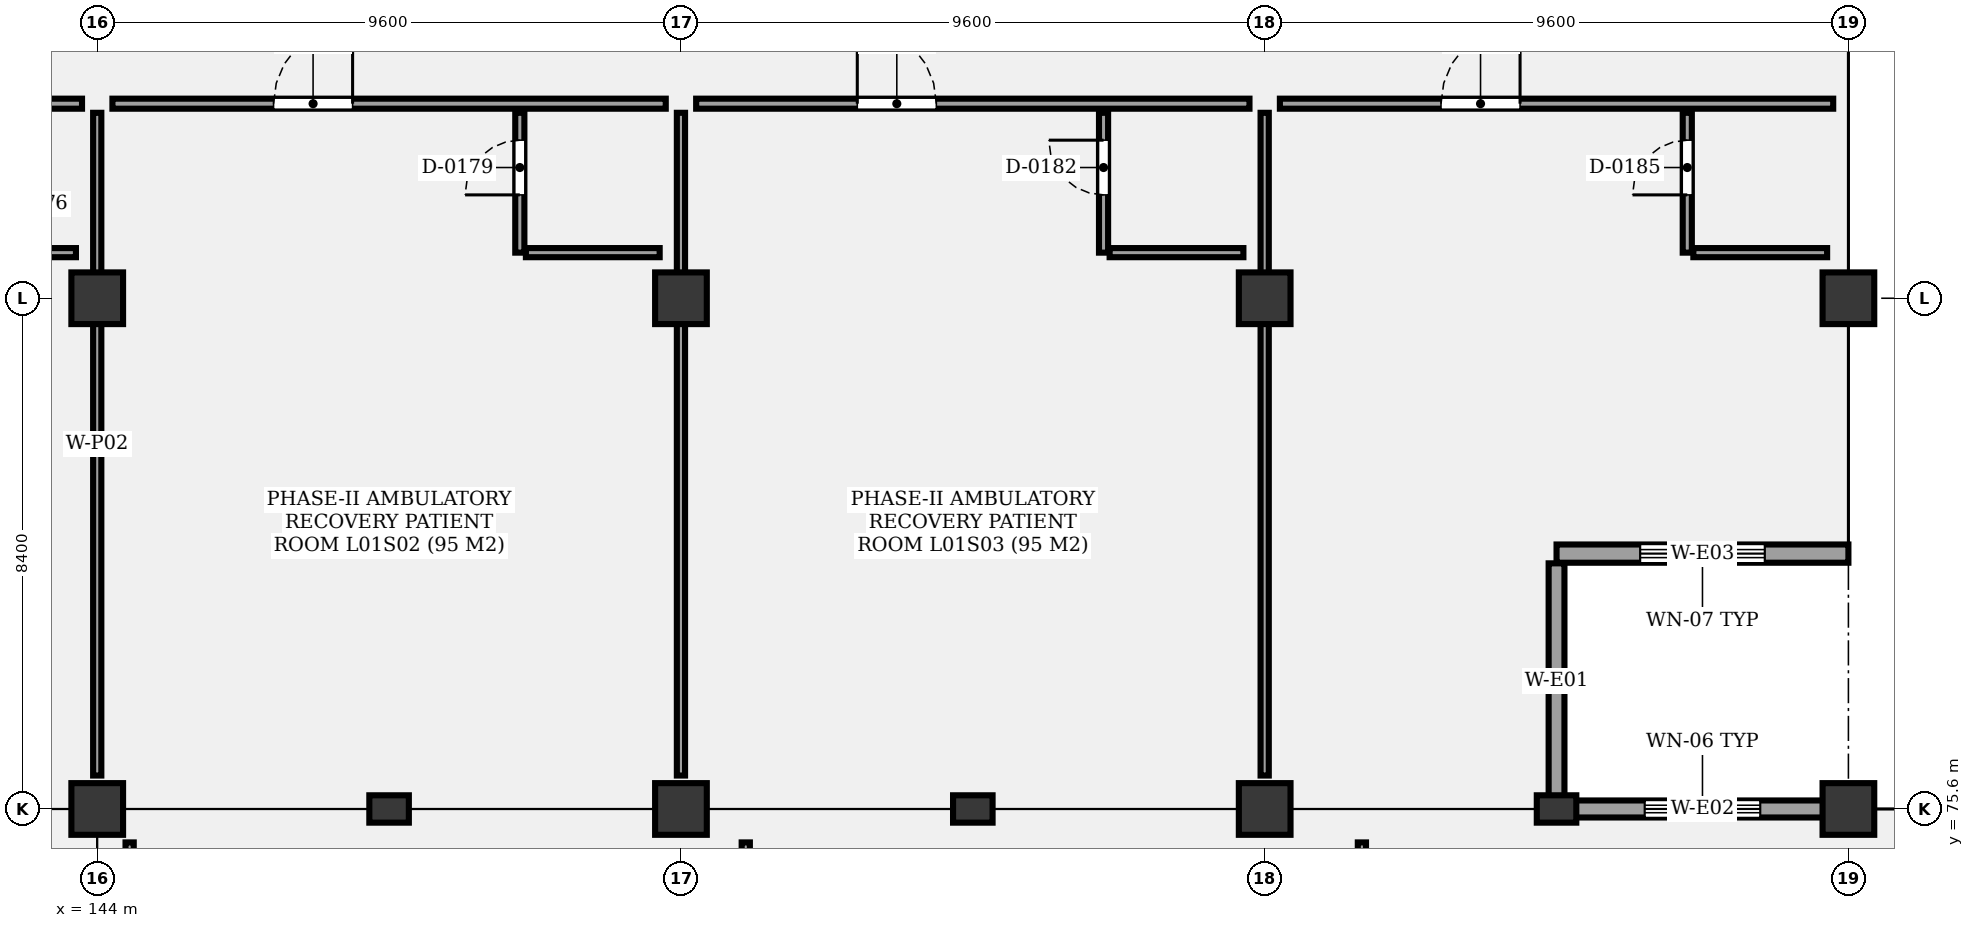
"""IFC4 building model, lengths in metres.
Left out: names, types, materials, properties, quantities, classifications, styles, units other than length and angle.
Written with IfcOpenShell. Run it as: python <this file> out.ifc"""

import sys

from ifc_helpers import new_model, si_unit, direction, frame, frame_2d, origin, origin_2d, place, context, subcontext, project, spatial, rectangle, extrude, element, fill, save


model = new_model("IFC4")
c1 = context("Model", 3, precision=1e-05, world=origin(), true_north=direction((0.0, 1.0)))
c2 = subcontext(c1, "Body", "Model", "MODEL_VIEW")
j1 = project(units=[si_unit("LENGTHUNIT", "METRE"), si_unit("PLANEANGLEUNIT", "RADIAN")], contexts=[c1])
p1 = place(None, origin())
s1 = spatial("IfcSite", under=j1, at=p1, CompositionType="ELEMENT")
p2 = place(p1, origin())
s2 = spatial("IfcBuilding", under=s1, at=p2, CompositionType="ELEMENT")
p3 = place(p2, frame((0.0, 0.0, 5.1)))
s3 = spatial("IfcBuildingStorey", under=s2, at=p3, CompositionType="ELEMENT", Elevation=5.1)
for number, where, z_axis, x_axis in (
    (1, (144.0, 75.6, 0.0), (0.0, 0.0, 1.0), (1.0, 0.0, 0.0)),
    (2, (144.0, 84.0, 0.0), (0.0, 0.0, 1.0), (1.0, 0.0, 0.0)),
    (3, (153.6, 75.6, 0.0), (0.0, 0.0, 1.0), (1.0, 0.0, 0.0)),
    (4, (153.6, 84.0, 0.0), (0.0, 0.0, 1.0), (1.0, 0.0, 0.0)),
    (5, (163.2, 75.6, 0.0), (0.0, 0.0, 1.0), (1.0, 0.0, 0.0)),
    (6, (163.2, 84.0, 0.0), (0.0, 0.0, 1.0), (1.0, 0.0, 0.0)),
    (7, (172.8, 75.6, 0.0), (0.0, 0.0, 1.0), (1.0, 0.0, 0.0)),
    (8, (172.8, 84.0, 0.0), (0.0, 0.0, 1.0), (1.0, 0.0, 0.0)),
):
    element("IfcColumn", number, at=place(p3, frame(where, z_axis=z_axis, x_axis=x_axis)), inside=s3, PredefinedType="COLUMN", context=c2, shape_type="SweptSolid", body=[
        extrude(rectangle(XDim=0.85, YDim=0.85, at=origin_2d()), origin(), (0.0, 0.0, 1.0), 4.8),
    ])
for number, where, z_axis, x_axis in (
    (9, (148.8, 75.6, 0.0), (0.0, 0.0, 1.0), (1.0, 0.0, 0.0)),
    (10, (158.4, 75.6, 0.0), (0.0, 0.0, 1.0), (1.0, 0.0, 0.0)),
    (11, (168.0, 75.6, 0.0), (0.0, 0.0, 1.0), (1.0, 0.0, 0.0)),
):
    element("IfcColumn", number, at=place(p3, frame(where, z_axis=z_axis, x_axis=x_axis)), inside=s3, PredefinedType="PILASTER", context=c2, shape_type="SweptSolid", body=[
        extrude(rectangle(XDim=0.65, YDim=0.45, at=origin_2d()), origin(), (0.0, 0.0, 1.0), 4.8),
    ])
p4 = place(p3, frame((168.0, 75.6, 0.0), z_axis=(0.0, 0.0, 1.0), x_axis=(1.0, 0.0, 0.0)))
e12 = element("IfcWall", 12, at=p4, inside=s3, PredefinedType="SOLIDWALL", context=c2, shape_type="SweptSolid", body=[
    extrude(rectangle(XDim=4.8, YDim=0.28, at=frame_2d((2.4, 0.0))), origin(), (0.0, 0.0, 1.0), 3.94),
])
p5 = place(p4, frame((1.45, 0.0, 0.85)))
e13 = element("IfcOpeningElement", 13, at=p5, cuts=e12, PredefinedType="OPENING", context=c2, shape_type="SweptSolid", body=[
    extrude(rectangle(XDim=1.9, YDim=1.2, at=frame_2d((0.95, 0.6))), frame((0.0, 0.15, 0.0), z_axis=(0.0, -1.0, 0.0), x_axis=(1.0, 0.0, 0.0)), (0.0, 0.0, 1.0), 0.3),
])
p6 = place(p3, frame((172.8, 79.8, 0.0), z_axis=(0.0, 0.0, 1.0), x_axis=(-1.0, 0.0, 0.0)))
e14 = element("IfcWall", 14, at=p6, inside=s3, PredefinedType="SOLIDWALL", context=c2, shape_type="SweptSolid", body=[
    extrude(rectangle(XDim=4.8, YDim=0.3, at=frame_2d((2.4, 0.0))), origin(), (0.0, 0.0, 1.0), 3.94),
])
p7 = place(p6, frame((1.375, 0.0, 0.85)))
e15 = element("IfcOpeningElement", 15, at=p7, cuts=e14, PredefinedType="OPENING", context=c2, shape_type="SweptSolid", body=[
    extrude(rectangle(XDim=2.05, YDim=1.2, at=frame_2d((1.025, 0.6))), frame((0.0, 0.16, 0.0), z_axis=(0.0, -1.0, 0.0), x_axis=(1.0, 0.0, 0.0)), (0.0, 0.0, 1.0), 0.32),
])
p8 = place(p3, frame((168.0, 79.64, 0.0), z_axis=(0.0, 0.0, 1.0), x_axis=(0.0, -1.0, 0.0)))
e16 = element("IfcWall", 16, at=p8, inside=s3, PredefinedType="SOLIDWALL", context=c2, shape_type="SweptSolid", body=[
    extrude(rectangle(XDim=3.88, YDim=0.26, at=frame_2d((1.94, 0.0))), origin(), (0.0, 0.0, 1.0), 3.94),
])
p9 = place(p3, frame((134.65, 87.2, 0.0), z_axis=(0.0, 0.0, 1.0), x_axis=(1.0, 0.0, 0.0)))
e17 = element("IfcWall", 17, at=p9, inside=s3, PredefinedType="PARTITIONING", context=c2, shape_type="SweptSolid", body=[
    extrude(rectangle(XDim=9.1, YDim=0.165, at=frame_2d((4.55, 0.0))), origin(), (0.0, 0.0, 1.0), 3.68),
])
p10 = place(p9, frame((2.65, 0.0, 0.0)))
e18 = element("IfcOpeningElement", 18, at=p10, cuts=e17, PredefinedType="OPENING", context=c2, shape_type="SweptSolid", body=[
    extrude(rectangle(XDim=1.3, YDim=2.2, at=frame_2d((0.65, 1.1))), frame((0.0, 0.093, 0.0), z_axis=(0.0, -1.0, 0.0), x_axis=(1.0, 0.0, 0.0)), (0.0, 0.0, 1.0), 0.185),
])
p11 = place(p3, frame((141.45, 84.75, 0.0), z_axis=(0.0, 0.0, 1.0), x_axis=(1.0, 0.0, 0.0)))
e19 = element("IfcWall", 19, at=p11, inside=s3, PredefinedType="PARTITIONING", context=c2, shape_type="SweptSolid", body=[
    extrude(rectangle(XDim=2.2, YDim=0.15, at=frame_2d((1.1, 0.0))), origin(), (0.0, 0.0, 1.0), 3.68),
])
p12 = place(p3, frame((144.25, 87.2, 0.0), z_axis=(0.0, 0.0, 1.0), x_axis=(1.0, 0.0, 0.0)))
e20 = element("IfcWall", 20, at=p12, inside=s3, PredefinedType="PARTITIONING", context=c2, shape_type="SweptSolid", body=[
    extrude(rectangle(XDim=9.1, YDim=0.165, at=frame_2d((4.55, 0.0))), origin(), (0.0, 0.0, 1.0), 3.68),
])
p13 = place(p12, frame((2.65, 0.0, 0.0)))
e21 = element("IfcOpeningElement", 21, at=p13, cuts=e20, PredefinedType="OPENING", context=c2, shape_type="SweptSolid", body=[
    extrude(rectangle(XDim=1.3, YDim=2.2, at=frame_2d((0.65, 1.1))), frame((0.0, 0.093, 0.0), z_axis=(0.0, -1.0, 0.0), x_axis=(1.0, 0.0, 0.0)), (0.0, 0.0, 1.0), 0.185),
])
p14 = place(p3, frame((150.95, 84.75, 0.0), z_axis=(0.0, 0.0, 1.0), x_axis=(0.0, 1.0, 0.0)))
e22 = element("IfcWall", 22, at=p14, inside=s3, PredefinedType="PARTITIONING", context=c2, shape_type="SweptSolid", body=[
    extrude(rectangle(XDim=2.3, YDim=0.15, at=frame_2d((1.15, 0.0))), origin(), (0.0, 0.0, 1.0), 3.68),
])
p15 = place(p14, frame((0.95, 0.0, 0.0)))
e23 = element("IfcOpeningElement", 23, at=p15, cuts=e22, PredefinedType="OPENING", context=c2, shape_type="SweptSolid", body=[
    extrude(rectangle(XDim=0.9, YDim=2.1, at=frame_2d((0.45, 1.05))), frame((0.0, 0.085, 0.0), z_axis=(0.0, -1.0, 0.0), x_axis=(1.0, 0.0, 0.0)), (0.0, 0.0, 1.0), 0.17),
])
p16 = place(p3, frame((151.05, 84.75, 0.0), z_axis=(0.0, 0.0, 1.0), x_axis=(1.0, 0.0, 0.0)))
e24 = element("IfcWall", 24, at=p16, inside=s3, PredefinedType="PARTITIONING", context=c2, shape_type="SweptSolid", body=[
    extrude(rectangle(XDim=2.2, YDim=0.15, at=frame_2d((1.1, 0.0))), origin(), (0.0, 0.0, 1.0), 3.68),
])
p17 = place(p3, frame((144.0, 76.15, 0.0), z_axis=(0.0, 0.0, 1.0), x_axis=(0.0, 1.0, 0.0)))
e25 = element("IfcWall", 25, at=p17, inside=s3, PredefinedType="PARTITIONING", context=c2, shape_type="SweptSolid", body=[
    extrude(rectangle(XDim=10.9, YDim=0.135, at=frame_2d((5.45, 0.0))), origin(), (0.0, 0.0, 1.0), 3.68),
])
p18 = place(p3, frame((153.85, 87.2, 0.0), z_axis=(0.0, 0.0, 1.0), x_axis=(1.0, 0.0, 0.0)))
e26 = element("IfcWall", 26, at=p18, inside=s3, PredefinedType="PARTITIONING", context=c2, shape_type="SweptSolid", body=[
    extrude(rectangle(XDim=9.1, YDim=0.165, at=frame_2d((4.55, 0.0))), origin(), (0.0, 0.0, 1.0), 3.68),
])
p19 = place(p18, frame((2.65, 0.0, 0.0)))
e27 = element("IfcOpeningElement", 27, at=p19, cuts=e26, PredefinedType="OPENING", context=c2, shape_type="SweptSolid", body=[
    extrude(rectangle(XDim=1.3, YDim=2.2, at=frame_2d((0.65, 1.1))), frame((0.0, 0.093, 0.0), z_axis=(0.0, -1.0, 0.0), x_axis=(1.0, 0.0, 0.0)), (0.0, 0.0, 1.0), 0.185),
])
p20 = place(p3, frame((160.55, 84.75, 0.0), z_axis=(0.0, 0.0, 1.0), x_axis=(0.0, 1.0, 0.0)))
e28 = element("IfcWall", 28, at=p20, inside=s3, PredefinedType="PARTITIONING", context=c2, shape_type="SweptSolid", body=[
    extrude(rectangle(XDim=2.3, YDim=0.15, at=frame_2d((1.15, 0.0))), origin(), (0.0, 0.0, 1.0), 3.68),
])
p21 = place(p20, frame((0.95, 0.0, 0.0)))
e29 = element("IfcOpeningElement", 29, at=p21, cuts=e28, PredefinedType="OPENING", context=c2, shape_type="SweptSolid", body=[
    extrude(rectangle(XDim=0.9, YDim=2.1, at=frame_2d((0.45, 1.05))), frame((0.0, 0.085, 0.0), z_axis=(0.0, -1.0, 0.0), x_axis=(1.0, 0.0, 0.0)), (0.0, 0.0, 1.0), 0.17),
])
p22 = place(p3, frame((160.65, 84.75, 0.0), z_axis=(0.0, 0.0, 1.0), x_axis=(1.0, 0.0, 0.0)))
e30 = element("IfcWall", 30, at=p22, inside=s3, PredefinedType="PARTITIONING", context=c2, shape_type="SweptSolid", body=[
    extrude(rectangle(XDim=2.2, YDim=0.15, at=frame_2d((1.1, 0.0))), origin(), (0.0, 0.0, 1.0), 3.68),
])
p23 = place(p3, frame((153.6, 76.15, 0.0), z_axis=(0.0, 0.0, 1.0), x_axis=(0.0, 1.0, 0.0)))
e31 = element("IfcWall", 31, at=p23, inside=s3, PredefinedType="PARTITIONING", context=c2, shape_type="SweptSolid", body=[
    extrude(rectangle(XDim=10.9, YDim=0.135, at=frame_2d((5.45, 0.0))), origin(), (0.0, 0.0, 1.0), 3.68),
])
p24 = place(p3, frame((163.45, 87.2, 0.0), z_axis=(0.0, 0.0, 1.0), x_axis=(1.0, 0.0, 0.0)))
e32 = element("IfcWall", 32, at=p24, inside=s3, PredefinedType="PARTITIONING", context=c2, shape_type="SweptSolid", body=[
    extrude(rectangle(XDim=9.1, YDim=0.165, at=frame_2d((4.55, 0.0))), origin(), (0.0, 0.0, 1.0), 3.68),
])
p25 = place(p24, frame((2.65, 0.0, 0.0)))
e33 = element("IfcOpeningElement", 33, at=p25, cuts=e32, PredefinedType="OPENING", context=c2, shape_type="SweptSolid", body=[
    extrude(rectangle(XDim=1.3, YDim=2.2, at=frame_2d((0.65, 1.1))), frame((0.0, 0.093, 0.0), z_axis=(0.0, -1.0, 0.0), x_axis=(1.0, 0.0, 0.0)), (0.0, 0.0, 1.0), 0.185),
])
p26 = place(p3, frame((170.15, 84.75, 0.0), z_axis=(0.0, 0.0, 1.0), x_axis=(0.0, 1.0, 0.0)))
e34 = element("IfcWall", 34, at=p26, inside=s3, PredefinedType="PARTITIONING", context=c2, shape_type="SweptSolid", body=[
    extrude(rectangle(XDim=2.3, YDim=0.15, at=frame_2d((1.15, 0.0))), origin(), (0.0, 0.0, 1.0), 3.68),
])
p27 = place(p26, frame((0.95, 0.0, 0.0)))
e35 = element("IfcOpeningElement", 35, at=p27, cuts=e34, PredefinedType="OPENING", context=c2, shape_type="SweptSolid", body=[
    extrude(rectangle(XDim=0.9, YDim=2.1, at=frame_2d((0.45, 1.05))), frame((0.0, 0.085, 0.0), z_axis=(0.0, -1.0, 0.0), x_axis=(1.0, 0.0, 0.0)), (0.0, 0.0, 1.0), 0.17),
])
p28 = place(p3, frame((170.25, 84.75, 0.0), z_axis=(0.0, 0.0, 1.0), x_axis=(1.0, 0.0, 0.0)))
e36 = element("IfcWall", 36, at=p28, inside=s3, PredefinedType="PARTITIONING", context=c2, shape_type="SweptSolid", body=[
    extrude(rectangle(XDim=2.2, YDim=0.15, at=frame_2d((1.1, 0.0))), origin(), (0.0, 0.0, 1.0), 3.68),
])
p29 = place(p3, frame((163.2, 76.15, 0.0), z_axis=(0.0, 0.0, 1.0), x_axis=(0.0, 1.0, 0.0)))
e37 = element("IfcWall", 37, at=p29, inside=s3, PredefinedType="PARTITIONING", context=c2, shape_type="SweptSolid", body=[
    extrude(rectangle(XDim=10.9, YDim=0.135, at=frame_2d((5.45, 0.0))), origin(), (0.0, 0.0, 1.0), 3.68),
])
for number, where, z_axis, x_axis in (
    (38, (144.533, 65.95, 0.0), (0.0, 0.0, 1.0), (0.0, 1.0, 0.0)),
    (39, (154.666, 65.95, 0.0), (0.0, 0.0, 1.0), (0.0, 1.0, 0.0)),
    (40, (164.799, 65.95, 0.0), (0.0, 0.0, 1.0), (0.0, 1.0, 0.0)),
):
    element("IfcWall", number, at=place(p3, frame(where, z_axis=z_axis, x_axis=x_axis)), inside=s3, PredefinedType="PARTITIONING", context=c2, shape_type="SweptSolid", body=[
        extrude(rectangle(XDim=9.1, YDim=0.135, at=frame_2d((4.55, 0.0))), origin(), (0.0, 0.0, 1.0), 3.68),
    ])
p30 = place(p5, origin())
e41 = element("IfcWindow", 41, at=p30, inside=s3, PartitioningType="SINGLE_PANEL", PredefinedType="WINDOW", context=c2, shape_type="SweptSolid", body=[
    extrude(rectangle(XDim=1.9, YDim=1.2, at=frame_2d((0.95, 0.6))), frame((0.0, 0.03, 0.0), z_axis=(0.0, -1.0, 0.0), x_axis=(1.0, 0.0, 0.0)), (0.0, 0.0, 1.0), 0.06),
])
fill(e13, e41)
p31 = place(p7, origin())
e42 = element("IfcWindow", 42, at=p31, inside=s3, PartitioningType="SINGLE_PANEL", PredefinedType="WINDOW", context=c2, shape_type="SweptSolid", body=[
    extrude(rectangle(XDim=2.05, YDim=1.2, at=frame_2d((1.025, 0.6))), frame((0.0, 0.03, 0.0), z_axis=(0.0, -1.0, 0.0), x_axis=(1.0, 0.0, 0.0)), (0.0, 0.0, 1.0), 0.06),
])
fill(e15, e42)
p32 = place(p13, origin())
e43 = element("IfcDoor", 43, at=p32, inside=s3, OperationType="SINGLE_SWING_RIGHT", PredefinedType="DOOR", context=c2, shape_type="SweptSolid", body=[
    extrude(rectangle(XDim=1.3, YDim=2.2, at=frame_2d((0.65, 1.1))), frame((0.0, 0.025, 0.0), z_axis=(0.0, -1.0, 0.0), x_axis=(1.0, 0.0, 0.0)), (0.0, 0.0, 1.0), 0.05),
])
fill(e21, e43)
p33 = place(p15, origin())
e44 = element("IfcDoor", 44, at=p33, inside=s3, OperationType="SINGLE_SWING_LEFT", PredefinedType="DOOR", context=c2, shape_type="SweptSolid", body=[
    extrude(rectangle(XDim=0.9, YDim=2.1, at=frame_2d((0.45, 1.05))), frame((0.0, 0.025, 0.0), z_axis=(0.0, -1.0, 0.0), x_axis=(1.0, 0.0, 0.0)), (0.0, 0.0, 1.0), 0.05),
])
fill(e23, e44)
p34 = place(p19, origin())
e45 = element("IfcDoor", 45, at=p34, inside=s3, OperationType="SINGLE_SWING_LEFT", PredefinedType="DOOR", context=c2, shape_type="SweptSolid", body=[
    extrude(rectangle(XDim=1.3, YDim=2.2, at=frame_2d((0.65, 1.1))), frame((0.0, 0.025, 0.0), z_axis=(0.0, -1.0, 0.0), x_axis=(1.0, 0.0, 0.0)), (0.0, 0.0, 1.0), 0.05),
])
fill(e27, e45)
p35 = place(p21, origin())
e46 = element("IfcDoor", 46, at=p35, inside=s3, OperationType="SINGLE_SWING_RIGHT", PredefinedType="DOOR", context=c2, shape_type="SweptSolid", body=[
    extrude(rectangle(XDim=0.9, YDim=2.1, at=frame_2d((0.45, 1.05))), frame((0.0, 0.025, 0.0), z_axis=(0.0, -1.0, 0.0), x_axis=(1.0, 0.0, 0.0)), (0.0, 0.0, 1.0), 0.05),
])
fill(e29, e46)
p36 = place(p25, origin())
e47 = element("IfcDoor", 47, at=p36, inside=s3, OperationType="SINGLE_SWING_RIGHT", PredefinedType="DOOR", context=c2, shape_type="SweptSolid", body=[
    extrude(rectangle(XDim=1.3, YDim=2.2, at=frame_2d((0.65, 1.1))), frame((0.0, 0.025, 0.0), z_axis=(0.0, -1.0, 0.0), x_axis=(1.0, 0.0, 0.0)), (0.0, 0.0, 1.0), 0.05),
])
fill(e33, e47)
p37 = place(p27, origin())
e48 = element("IfcDoor", 48, at=p37, inside=s3, OperationType="SINGLE_SWING_LEFT", PredefinedType="DOOR", context=c2, shape_type="SweptSolid", body=[
    extrude(rectangle(XDim=0.9, YDim=2.1, at=frame_2d((0.45, 1.05))), frame((0.0, 0.025, 0.0), z_axis=(0.0, -1.0, 0.0), x_axis=(1.0, 0.0, 0.0)), (0.0, 0.0, 1.0), 0.05),
])
fill(e35, e48)
save(model, sys.argv[1])
